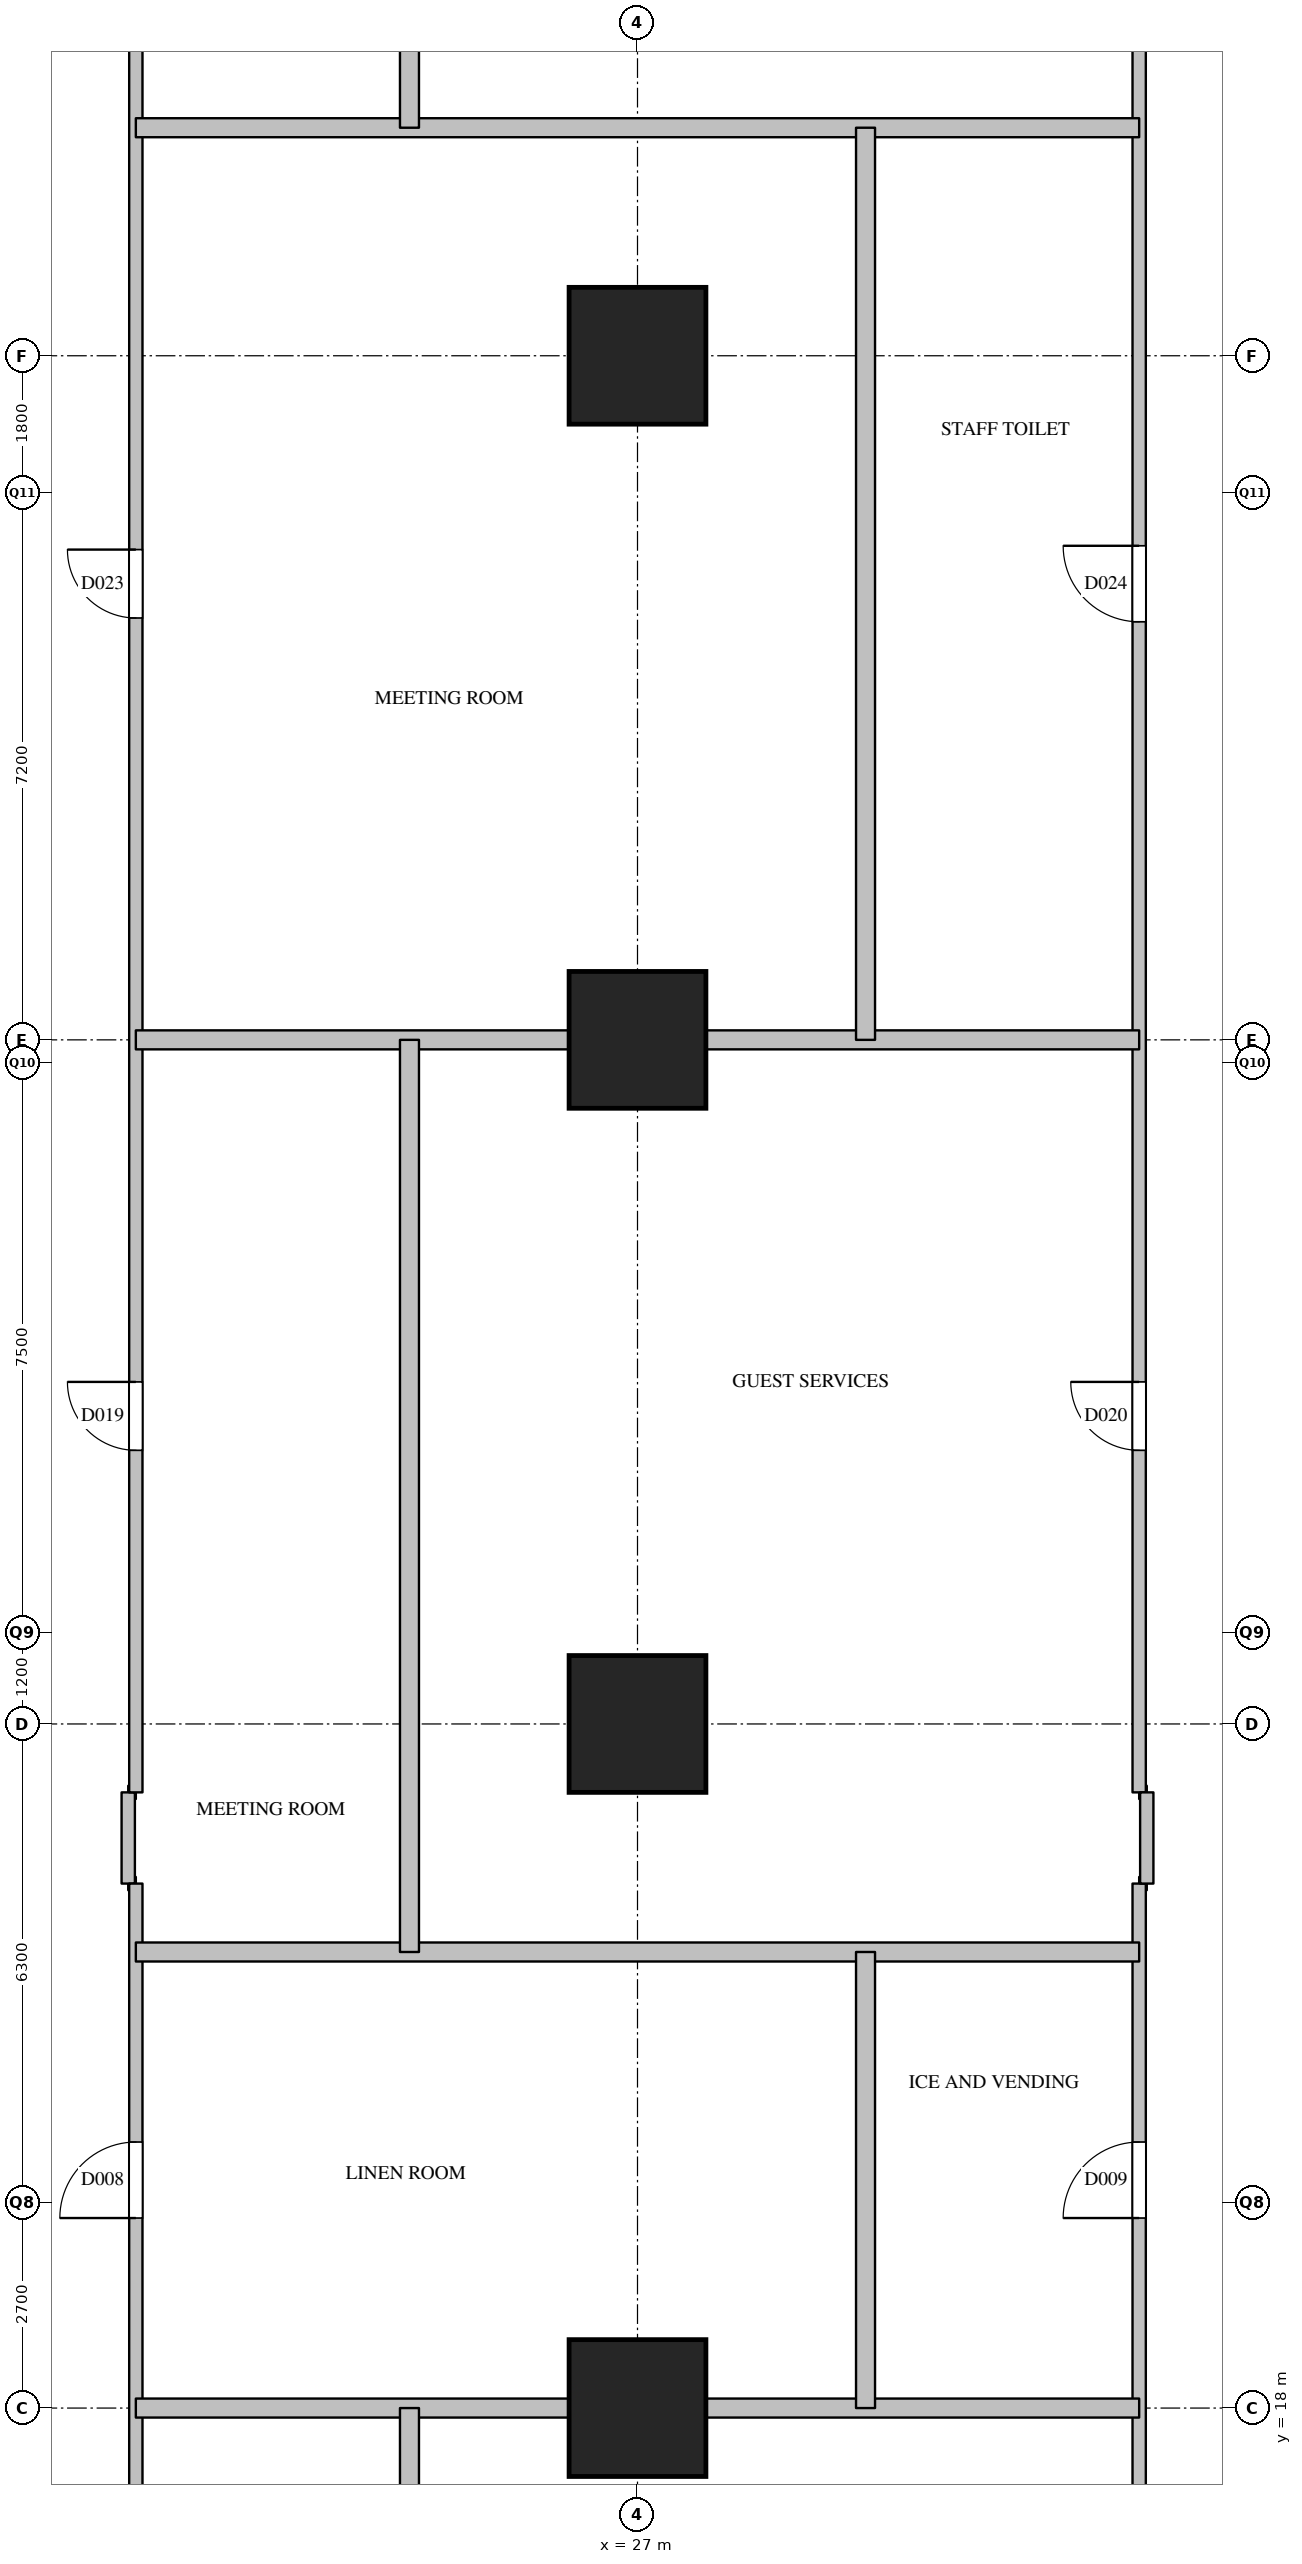
"""IFC4 building model, lengths in metres.
Left out: names, types, materials, properties, quantities, classifications, styles, units other than length and angle.
Written with IfcOpenShell. Run it as: python <this file> out.ifc"""

import sys

from ifc_helpers import new_model, si_unit, direction, frame, frame_2d, origin, origin_2d, place, context, subcontext, project, spatial, rectangle, extrude, element, fill, save


model = new_model("IFC4")
c1 = context("Model", 3, precision=1e-05, world=origin(), true_north=direction((0.0, 1.0)))
c2 = subcontext(c1, "Body", "Model", "MODEL_VIEW")
j1 = project(units=[si_unit("LENGTHUNIT", "METRE"), si_unit("PLANEANGLEUNIT", "RADIAN")], contexts=[c1])
p1 = place(None, origin())
s1 = spatial("IfcSite", under=j1, at=p1, CompositionType="ELEMENT")
p2 = place(p1, origin())
s2 = spatial("IfcBuilding", under=s1, at=p2, CompositionType="ELEMENT")
p3 = place(p2, frame((0.0, 0.0, 65.2)))
s3 = spatial("IfcBuildingStorey", under=s2, at=p3, CompositionType="ELEMENT", Elevation=65.2)
for number, where, z_axis, x_axis in (
    (1, (27.0, 18.0, 0.0), (0.0, 0.0, 1.0), (1.0, 0.0, 0.0)),
    (2, (27.0, 27.0, 0.0), (0.0, 0.0, 1.0), (1.0, 0.0, 0.0)),
    (3, (27.0, 36.0, 0.0), (0.0, 0.0, 1.0), (1.0, 0.0, 0.0)),
    (4, (27.0, 45.0, 0.0), (0.0, 0.0, 1.0), (1.0, 0.0, 0.0)),
):
    element("IfcColumn", number, at=place(p3, frame(where, z_axis=z_axis, x_axis=x_axis)), inside=s3, PredefinedType="COLUMN", context=c2, shape_type="SweptSolid", body=[
        extrude(rectangle(XDim=1.8, YDim=1.8, at=origin_2d()), origin(), (0.0, 0.0, 1.0), 3.8),
    ])
for number, where, z_axis, x_axis in (
    (5, (20.3, 24.9, 0.0), (0.0, 0.0, 1.0), (1.0, 0.0, 0.0)),
    (6, (33.6, 24.9, 0.0), (0.0, 0.0, 1.0), (1.0, 0.0, 0.0)),
    (7, (20.3, 26.1, 0.0), (0.0, 0.0, 1.0), (1.0, 0.0, 0.0)),
    (8, (33.6, 26.1, 0.0), (0.0, 0.0, 1.0), (1.0, 0.0, 0.0)),
):
    element("IfcWall", number, at=place(p3, frame(where, z_axis=z_axis, x_axis=x_axis)), inside=s3, PredefinedType="PARTITIONING", context=c2, shape_type="SweptSolid", body=[
        extrude(rectangle(XDim=0.1, YDim=0.175, at=frame_2d((0.05, 0.0))), origin(), (0.0, 0.0, 1.0), 3.5),
    ])
p4 = place(p3, frame((20.3, 24.9, 0.0), z_axis=(0.0, 0.0, 1.0), x_axis=(0.0, 1.0, 0.0)))
e9 = element("IfcWall", 9, at=p4, inside=s3, PredefinedType="PARTITIONING", context=c2, shape_type="SweptSolid", body=[
    extrude(rectangle(XDim=1.2, YDim=0.175, at=frame_2d((0.6, 0.0))), origin(), (0.0, 0.0, 1.0), 3.5),
])
p5 = place(p3, frame((20.4, 6.6, 0.0), z_axis=(0.0, 0.0, 1.0), x_axis=(0.0, 1.0, 0.0)))
e10 = element("IfcWall", 10, at=p5, inside=s3, PredefinedType="PARTITIONING", context=c2, shape_type="SweptSolid", body=[
    extrude(rectangle(XDim=18.3, YDim=0.175, at=frame_2d((9.15, 0.0))), origin(), (0.0, 0.0, 1.0), 3.5),
])
p6 = place(p5, frame((5.25, 0.0, 0.0)))
e11 = element("IfcOpeningElement", 11, at=p6, cuts=e10, PredefinedType="OPENING", context=c2, shape_type="SweptSolid", body=[
    extrude(rectangle(XDim=0.9, YDim=2.1, at=frame_2d((0.45, 1.05))), frame((0.0, 0.097, 0.0), z_axis=(0.0, -1.0, 0.0), x_axis=(1.0, 0.0, 0.0)), (0.0, 0.0, 1.0), 0.195),
])
p7 = place(p5, frame((13.9, 0.0, 0.0)))
e12 = element("IfcOpeningElement", 12, at=p7, cuts=e10, PredefinedType="OPENING", context=c2, shape_type="SweptSolid", body=[
    extrude(rectangle(XDim=1.0, YDim=2.1, at=frame_2d((0.5, 1.05))), frame((0.0, 0.097, 0.0), z_axis=(0.0, -1.0, 0.0), x_axis=(1.0, 0.0, 0.0)), (0.0, 0.0, 1.0), 0.195),
])
p8 = place(p3, frame((20.4, 26.1, 0.0), z_axis=(0.0, 0.0, 1.0), x_axis=(0.0, 1.0, 0.0)))
e13 = element("IfcWall", 13, at=p8, inside=s3, PredefinedType="PARTITIONING", context=c2, shape_type="SweptSolid", body=[
    extrude(rectangle(XDim=26.3, YDim=0.175, at=frame_2d((13.15, 0.0))), origin(), (0.0, 0.0, 1.0), 2.5),
])
p9 = place(p8, frame((4.5, 0.0, 0.0)))
e14 = element("IfcOpeningElement", 14, at=p9, cuts=e13, PredefinedType="OPENING", context=c2, shape_type="SweptSolid", body=[
    extrude(rectangle(XDim=0.9, YDim=2.1, at=frame_2d((0.45, 1.05))), frame((0.0, 0.097, 0.0), z_axis=(0.0, -1.0, 0.0), x_axis=(1.0, 0.0, 0.0)), (0.0, 0.0, 1.0), 0.195),
])
p10 = place(p8, frame((15.45, 0.0, 0.0)))
e15 = element("IfcOpeningElement", 15, at=p10, cuts=e13, PredefinedType="OPENING", context=c2, shape_type="SweptSolid", body=[
    extrude(rectangle(XDim=0.9, YDim=2.1, at=frame_2d((0.45, 1.05))), frame((0.0, 0.097, 0.0), z_axis=(0.0, -1.0, 0.0), x_axis=(1.0, 0.0, 0.0)), (0.0, 0.0, 1.0), 0.195),
])
p11 = place(p8, frame((23.65, 0.0, 0.0)))
e16 = element("IfcOpeningElement", 16, at=p11, cuts=e13, PredefinedType="OPENING", context=c2, shape_type="SweptSolid", body=[
    extrude(rectangle(XDim=0.9, YDim=2.1, at=frame_2d((0.45, 1.05))), frame((0.0, 0.097, 0.0), z_axis=(0.0, -1.0, 0.0), x_axis=(1.0, 0.0, 0.0)), (0.0, 0.0, 1.0), 0.195),
])
p12 = place(p3, frame((33.6, 6.6, 0.0), z_axis=(0.0, 0.0, 1.0), x_axis=(0.0, 1.0, 0.0)))
e17 = element("IfcWall", 17, at=p12, inside=s3, PredefinedType="PARTITIONING", context=c2, shape_type="SweptSolid", body=[
    extrude(rectangle(XDim=18.3, YDim=0.175, at=frame_2d((9.15, 0.0))), origin(), (0.0, 0.0, 1.0), 3.5),
])
p13 = place(p12, frame((5.25, 0.0, 0.0)))
e18 = element("IfcOpeningElement", 18, at=p13, cuts=e17, PredefinedType="OPENING", context=c2, shape_type="SweptSolid", body=[
    extrude(rectangle(XDim=0.9, YDim=2.1, at=frame_2d((0.45, 1.05))), frame((0.0, 0.097, 0.0), z_axis=(0.0, -1.0, 0.0), x_axis=(1.0, 0.0, 0.0)), (0.0, 0.0, 1.0), 0.195),
])
p14 = place(p12, frame((13.9, 0.0, 0.0)))
e19 = element("IfcOpeningElement", 19, at=p14, cuts=e17, PredefinedType="OPENING", context=c2, shape_type="SweptSolid", body=[
    extrude(rectangle(XDim=1.0, YDim=2.1, at=frame_2d((0.5, 1.05))), frame((0.0, 0.097, 0.0), z_axis=(0.0, -1.0, 0.0), x_axis=(1.0, 0.0, 0.0)), (0.0, 0.0, 1.0), 0.195),
])
p15 = place(p3, frame((33.6, 26.1, 0.0), z_axis=(0.0, 0.0, 1.0), x_axis=(0.0, 1.0, 0.0)))
e20 = element("IfcWall", 20, at=p15, inside=s3, PredefinedType="PARTITIONING", context=c2, shape_type="SweptSolid", body=[
    extrude(rectangle(XDim=26.3, YDim=0.175, at=frame_2d((13.15, 0.0))), origin(), (0.0, 0.0, 1.0), 2.5),
])
p16 = place(p15, frame((4.5, 0.0, 0.0)))
e21 = element("IfcOpeningElement", 21, at=p16, cuts=e20, PredefinedType="OPENING", context=c2, shape_type="SweptSolid", body=[
    extrude(rectangle(XDim=0.9, YDim=2.1, at=frame_2d((0.45, 1.05))), frame((0.0, 0.097, 0.0), z_axis=(0.0, -1.0, 0.0), x_axis=(1.0, 0.0, 0.0)), (0.0, 0.0, 1.0), 0.195),
])
p17 = place(p15, frame((15.4, 0.0, 0.0)))
e22 = element("IfcOpeningElement", 22, at=p17, cuts=e20, PredefinedType="OPENING", context=c2, shape_type="SweptSolid", body=[
    extrude(rectangle(XDim=1.0, YDim=2.1, at=frame_2d((0.5, 1.05))), frame((0.0, 0.097, 0.0), z_axis=(0.0, -1.0, 0.0), x_axis=(1.0, 0.0, 0.0)), (0.0, 0.0, 1.0), 0.195),
])
p18 = place(p15, frame((23.65, 0.0, 0.0)))
e23 = element("IfcOpeningElement", 23, at=p18, cuts=e20, PredefinedType="OPENING", context=c2, shape_type="SweptSolid", body=[
    extrude(rectangle(XDim=0.9, YDim=2.1, at=frame_2d((0.45, 1.05))), frame((0.0, 0.097, 0.0), z_axis=(0.0, -1.0, 0.0), x_axis=(1.0, 0.0, 0.0)), (0.0, 0.0, 1.0), 0.195),
])
p19 = place(p3, frame((33.7, 24.9, 0.0), z_axis=(0.0, 0.0, 1.0), x_axis=(0.0, 1.0, 0.0)))
e24 = element("IfcWall", 24, at=p19, inside=s3, PredefinedType="PARTITIONING", context=c2, shape_type="SweptSolid", body=[
    extrude(rectangle(XDim=1.2, YDim=0.175, at=frame_2d((0.6, 0.0))), origin(), (0.0, 0.0, 1.0), 3.5),
])
p20 = place(p3, frame((20.4, 18.0, 0.0), z_axis=(0.0, 0.0, 1.0), x_axis=(1.0, 0.0, 0.0)))
e25 = element("IfcWall", 25, at=p20, inside=s3, PredefinedType="PARTITIONING", context=c2, shape_type="SweptSolid", body=[
    extrude(rectangle(XDim=13.2, YDim=0.25, at=frame_2d((6.6, 0.0))), origin(), (0.0, 0.0, 1.0), 3.5),
])
p21 = place(p3, frame((20.4, 24.0, 0.0), z_axis=(0.0, 0.0, 1.0), x_axis=(1.0, 0.0, 0.0)))
e26 = element("IfcWall", 26, at=p21, inside=s3, PredefinedType="PARTITIONING", context=c2, shape_type="SweptSolid", body=[
    extrude(rectangle(XDim=13.2, YDim=0.25, at=frame_2d((6.6, 0.0))), origin(), (0.0, 0.0, 1.0), 2.5),
])
p22 = place(p3, frame((20.4, 36.0, 0.0), z_axis=(0.0, 0.0, 1.0), x_axis=(1.0, 0.0, 0.0)))
e27 = element("IfcWall", 27, at=p22, inside=s3, PredefinedType="PARTITIONING", context=c2, shape_type="SweptSolid", body=[
    extrude(rectangle(XDim=13.2, YDim=0.25, at=frame_2d((6.6, 0.0))), origin(), (0.0, 0.0, 1.0), 3.5),
])
p23 = place(p3, frame((20.4, 48.0, 0.0), z_axis=(0.0, 0.0, 1.0), x_axis=(1.0, 0.0, 0.0)))
e28 = element("IfcWall", 28, at=p23, inside=s3, PredefinedType="PARTITIONING", context=c2, shape_type="SweptSolid", body=[
    extrude(rectangle(XDim=13.2, YDim=0.25, at=frame_2d((6.6, 0.0))), origin(), (0.0, 0.0, 1.0), 2.5),
])
p24 = place(p3, frame((24.0, 0.0, 0.0), z_axis=(0.0, 0.0, 1.0), x_axis=(0.0, 1.0, 0.0)))
e29 = element("IfcWall", 29, at=p24, inside=s3, PredefinedType="PARTITIONING", context=c2, shape_type="SweptSolid", body=[
    extrude(rectangle(XDim=18.0, YDim=0.25, at=frame_2d((9.0, 0.0))), origin(), (0.0, 0.0, 1.0), 2.5),
])
p25 = place(p3, frame((24.0, 24.0, 0.0), z_axis=(0.0, 0.0, 1.0), x_axis=(0.0, 1.0, 0.0)))
e30 = element("IfcWall", 30, at=p25, inside=s3, PredefinedType="PARTITIONING", context=c2, shape_type="SweptSolid", body=[
    extrude(rectangle(XDim=12.0, YDim=0.25, at=frame_2d((6.0, 0.0))), origin(), (0.0, 0.0, 1.0), 2.5),
])
p26 = place(p3, frame((24.0, 48.0, 0.0), z_axis=(0.0, 0.0, 1.0), x_axis=(0.0, 1.0, 0.0)))
e31 = element("IfcWall", 31, at=p26, inside=s3, PredefinedType="PARTITIONING", context=c2, shape_type="SweptSolid", body=[
    extrude(rectangle(XDim=6.0, YDim=0.25, at=frame_2d((3.0, 0.0))), origin(), (0.0, 0.0, 1.0), 2.5),
])
p27 = place(p3, frame((30.0, 18.0, 0.0), z_axis=(0.0, 0.0, 1.0), x_axis=(0.0, 1.0, 0.0)))
e32 = element("IfcWall", 32, at=p27, inside=s3, PredefinedType="PARTITIONING", context=c2, shape_type="SweptSolid", body=[
    extrude(rectangle(XDim=6.0, YDim=0.25, at=frame_2d((3.0, 0.0))), origin(), (0.0, 0.0, 1.0), 3.5),
])
p28 = place(p3, frame((30.0, 36.0, 0.0), z_axis=(0.0, 0.0, 1.0), x_axis=(0.0, 1.0, 0.0)))
e33 = element("IfcWall", 33, at=p28, inside=s3, PredefinedType="PARTITIONING", context=c2, shape_type="SweptSolid", body=[
    extrude(rectangle(XDim=12.0, YDim=0.25, at=frame_2d((6.0, 0.0))), origin(), (0.0, 0.0, 1.0), 3.5),
])
p29 = place(p7, origin())
e34 = element("IfcDoor", 34, at=p29, inside=s3, OperationType="SINGLE_SWING_LEFT", PredefinedType="DOOR", context=c2, shape_type="SweptSolid", body=[
    extrude(rectangle(XDim=1.0, YDim=2.1, at=frame_2d((0.5, 1.05))), frame((0.0, 0.025, 0.0), z_axis=(0.0, -1.0, 0.0), x_axis=(1.0, 0.0, 0.0)), (0.0, 0.0, 1.0), 0.05),
])
fill(e12, e34)
p30 = place(p14, origin())
e35 = element("IfcDoor", 35, at=p30, inside=s3, OperationType="SINGLE_SWING_LEFT", PredefinedType="DOOR", context=c2, shape_type="SweptSolid", body=[
    extrude(rectangle(XDim=1.0, YDim=2.1, at=frame_2d((0.5, 1.05))), frame((0.0, 0.025, 0.0), z_axis=(0.0, -1.0, 0.0), x_axis=(1.0, 0.0, 0.0)), (0.0, 0.0, 1.0), 0.05),
])
fill(e19, e35)
p31 = place(p9, origin())
e36 = element("IfcDoor", 36, at=p31, inside=s3, OperationType="SINGLE_SWING_RIGHT", PredefinedType="DOOR", context=c2, shape_type="SweptSolid", body=[
    extrude(rectangle(XDim=0.9, YDim=2.1, at=frame_2d((0.45, 1.05))), frame((0.0, 0.025, 0.0), z_axis=(0.0, -1.0, 0.0), x_axis=(1.0, 0.0, 0.0)), (0.0, 0.0, 1.0), 0.05),
])
fill(e14, e36)
p32 = place(p16, origin())
e37 = element("IfcDoor", 37, at=p32, inside=s3, OperationType="SINGLE_SWING_RIGHT", PredefinedType="DOOR", context=c2, shape_type="SweptSolid", body=[
    extrude(rectangle(XDim=0.9, YDim=2.1, at=frame_2d((0.45, 1.05))), frame((0.0, 0.025, 0.0), z_axis=(0.0, -1.0, 0.0), x_axis=(1.0, 0.0, 0.0)), (0.0, 0.0, 1.0), 0.05),
])
fill(e21, e37)
p33 = place(p10, origin())
e38 = element("IfcDoor", 38, at=p33, inside=s3, OperationType="SINGLE_SWING_RIGHT", PredefinedType="DOOR", context=c2, shape_type="SweptSolid", body=[
    extrude(rectangle(XDim=0.9, YDim=2.1, at=frame_2d((0.45, 1.05))), frame((0.0, 0.025, 0.0), z_axis=(0.0, -1.0, 0.0), x_axis=(1.0, 0.0, 0.0)), (0.0, 0.0, 1.0), 0.05),
])
fill(e15, e38)
p34 = place(p17, origin())
e39 = element("IfcDoor", 39, at=p34, inside=s3, OperationType="SINGLE_SWING_RIGHT", PredefinedType="DOOR", context=c2, shape_type="SweptSolid", body=[
    extrude(rectangle(XDim=1.0, YDim=2.1, at=frame_2d((0.5, 1.05))), frame((0.0, 0.025, 0.0), z_axis=(0.0, -1.0, 0.0), x_axis=(1.0, 0.0, 0.0)), (0.0, 0.0, 1.0), 0.05),
])
fill(e22, e39)
save(model, sys.argv[1])
